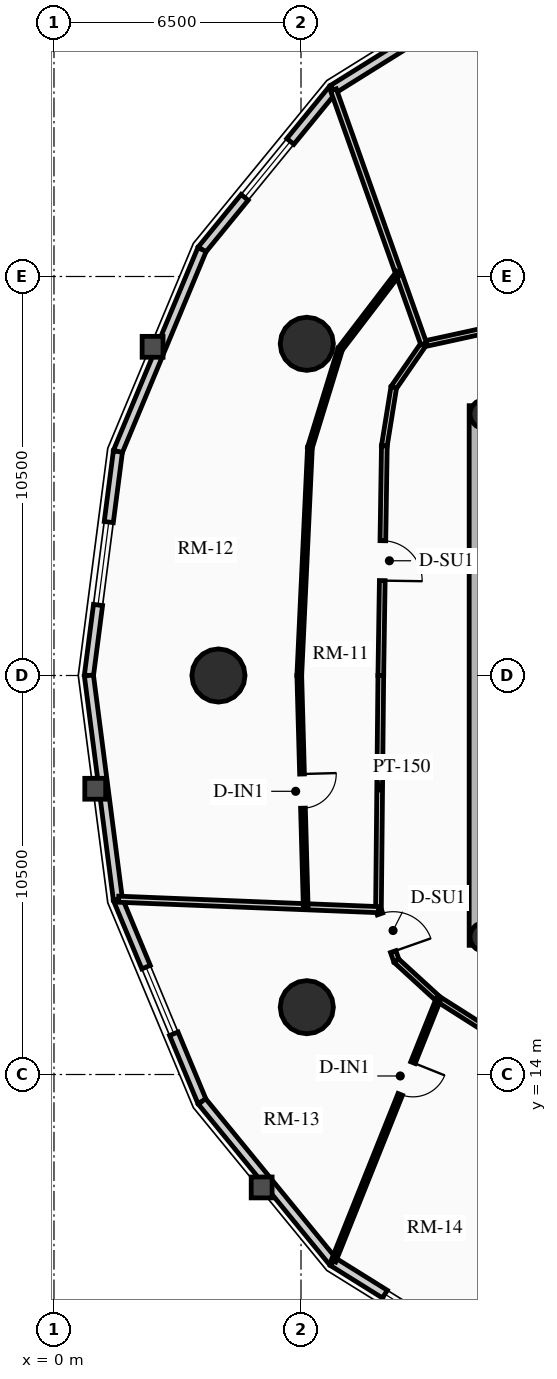
"""IFC4 building model, lengths in metres.
Left out: names, types, materials, properties, quantities, classifications, styles, units other than length and angle.
Written with IfcOpenShell. Run it as: python <this file> out.ifc"""

import sys

from ifc_helpers import new_model, si_unit, direction, frame, frame_2d, origin, origin_2d, place, context, subcontext, project, spatial, rectangle, circle, hollow_circle, extrude, source, transform, mapped, element, fill, save


model = new_model("IFC4")
c1 = context("Model", 3, precision=1e-05, world=origin(), true_north=direction((0.0, 1.0)))
c2 = subcontext(c1, "Body", "Model", "MODEL_VIEW")
j1 = project(units=[si_unit("LENGTHUNIT", "METRE"), si_unit("PLANEANGLEUNIT", "RADIAN")], contexts=[c1])
p1 = place(None, origin())
s1 = spatial("IfcSite", under=j1, at=p1, CompositionType="ELEMENT")
p2 = place(p1, origin())
s2 = spatial("IfcBuilding", under=s1, at=p2, CompositionType="ELEMENT")
p3 = place(p2, frame((0.0, 0.0, 113.8)))
s3 = spatial("IfcBuildingStorey", under=s2, at=p3, CompositionType="ELEMENT", Elevation=113.8)
p4 = place(p3, frame((11.15, 17.4, 0.0), z_axis=(0.0, 0.0, 1.0), x_axis=(0.0, 1.0, 0.0)))
e1 = element("IfcWall", 1, at=p4, inside=s3, PredefinedType="SHEAR", context=c2, shape_type="SweptSolid", body=[
    extrude(rectangle(XDim=14.2, YDim=0.45, at=frame_2d((7.1, 0.0))), origin(), (0.0, 0.0, 1.0), 2.91),
])
for number, where, z_axis, x_axis in (
    (2, (11.325, 17.62, 0.0), (0.0, 0.0, 1.0), (1.0, 0.0, 0.0)),
    (3, (11.325, 31.38, 0.0), (0.0, 0.0, 1.0), (1.0, 0.0, 0.0)),
):
    element("IfcColumn", number, at=place(p3, frame(where, z_axis=z_axis, x_axis=x_axis)), inside=s3, PredefinedType="COLUMN", context=c2, shape_type="SweptSolid", body=[
        extrude(hollow_circle(Radius=0.38, WallThickness=0.032, at=origin_2d()), origin(), (0.0, 0.0, 1.0), 2.91),
    ])
for number, where, z_axis, x_axis in (
    (4, (6.653, 33.229, 0.0), (0.0, 0.0, 1.0), (1.0, 0.0, 0.0)),
    (5, (4.328, 24.5, 0.0), (0.0, 0.0, 1.0), (1.0, 0.0, 0.0)),
    (6, (6.653, 15.771, 0.0), (0.0, 0.0, 1.0), (1.0, 0.0, 0.0)),
):
    element("IfcColumn", number, at=place(p3, frame(where, z_axis=z_axis, x_axis=x_axis)), inside=s3, PredefinedType="USERDEFINED", context=c2, shape_type="SweptSolid", body=[
        extrude(circle(Radius=0.7, at=origin_2d()), origin(), (0.0, 0.0, 1.0), 2.91),
    ])
p5 = place(p3, frame((7.342, 39.928, 0.0), z_axis=(0.0, 0.0, 1.0), x_axis=(0.848520380187, 0.529162701263, 0.0)))
e7 = element("IfcWall", 7, at=p5, inside=s3, PredefinedType="SOLIDWALL", context=c2, shape_type="SweptSolid", body=[
    extrude(rectangle(XDim=5.119, YDim=0.24, at=frame_2d((2.56, 0.0))), origin(), (0.0, 0.0, 1.0), 2.179),
])
p6 = place(p3, frame((3.895, 35.709, 0.0), z_axis=(0.0, 0.0, 1.0), x_axis=(0.632700781152, 0.77439635945, 0.0)))
e8 = element("IfcWall", 8, at=p6, inside=s3, PredefinedType="SOLIDWALL", context=c2, shape_type="SweptSolid", body=[
    extrude(rectangle(XDim=5.448, YDim=0.24, at=frame_2d((2.724, 0.0))), origin(), (0.0, 0.0, 1.0), 2.179),
])
m1 = source(origin(), c2, "Body", "SweptSolid", [
    extrude(rectangle(XDim=1.9, YDim=1.35, at=frame_2d((0.95, 0.675))), frame((0.0, 0.13, 0.0), z_axis=(0.0, -1.0, 0.0), x_axis=(1.0, 0.0, 0.0)), (0.0, 0.0, 1.0), 0.26),
])
p7 = place(p6, frame((1.774, 0.0, 0.65)))
e9 = element("IfcOpeningElement", 9, at=p7, cuts=e8, PredefinedType="OPENING", context=c2, shape_type="MappedRepresentation", body=[
    mapped(m1, transform((0.0, 0.0, 0.0), x_axis=(1.0, 0.0, 0.0), y_axis=(0.0, 1.0, 0.0), z_axis=(0.0, 0.0, 1.0), scale=1.0)),
])
p8 = place(p3, frame((1.682, 30.393, 0.0), z_axis=(0.0, 0.0, 1.0), x_axis=(0.384344417632, 0.923189779317, 0.0)))
e10 = element("IfcWall", 10, at=p8, inside=s3, PredefinedType="SOLIDWALL", context=c2, shape_type="SweptSolid", body=[
    extrude(rectangle(XDim=5.758, YDim=0.24, at=frame_2d((2.879, 0.0))), origin(), (0.0, 0.0, 1.0), 2.179),
])
p9 = place(p3, frame((0.919, 24.5, 0.0), z_axis=(0.0, 0.0, 1.0), x_axis=(0.128351991996, 0.991728675672, 0.0)))
e11 = element("IfcWall", 11, at=p9, inside=s3, PredefinedType="SOLIDWALL", context=c2, shape_type="SweptSolid", body=[
    extrude(rectangle(XDim=5.942, YDim=0.24, at=frame_2d((2.971, 0.0))), origin(), (0.0, 0.0, 1.0), 2.179),
])
m2 = source(origin(), c2, "Body", "SweptSolid", [
    extrude(rectangle(XDim=2.2, YDim=1.35, at=frame_2d((1.1, 0.675))), frame((0.0, 0.13, 0.0), z_axis=(0.0, -1.0, 0.0), x_axis=(1.0, 0.0, 0.0)), (0.0, 0.0, 1.0), 0.26),
])
p10 = place(p9, frame((1.871, 0.0, 0.65)))
e12 = element("IfcOpeningElement", 12, at=p10, cuts=e11, PredefinedType="OPENING", context=c2, shape_type="MappedRepresentation", body=[
    mapped(m2, transform((0.0, 0.0, 0.0), x_axis=(1.0, 0.0, 0.0), y_axis=(0.0, 1.0, 0.0), z_axis=(0.0, 0.0, 1.0), scale=1.0)),
])
p11 = place(p3, frame((1.682, 18.607, 0.0), z_axis=(0.0, 0.0, 1.0), x_axis=(-0.128351991996, 0.991728675672, 0.0)))
e13 = element("IfcWall", 13, at=p11, inside=s3, PredefinedType="SOLIDWALL", context=c2, shape_type="SweptSolid", body=[
    extrude(rectangle(XDim=5.942, YDim=0.24, at=frame_2d((2.971, 0.0))), origin(), (0.0, 0.0, 1.0), 2.179),
])
p12 = place(p3, frame((3.895, 13.291, 0.0), z_axis=(0.0, 0.0, 1.0), x_axis=(-0.384344417632, 0.923189779317, 0.0)))
e14 = element("IfcWall", 14, at=p12, inside=s3, PredefinedType="SOLIDWALL", context=c2, shape_type="SweptSolid", body=[
    extrude(rectangle(XDim=5.758, YDim=0.24, at=frame_2d((2.879, 0.0))), origin(), (0.0, 0.0, 1.0), 2.179),
])
p13 = place(p12, frame((1.929, 0.0, 0.65)))
e15 = element("IfcOpeningElement", 15, at=p13, cuts=e14, PredefinedType="OPENING", context=c2, shape_type="MappedRepresentation", body=[
    mapped(m1, transform((0.0, 0.0, 0.0), x_axis=(1.0, 0.0, 0.0), y_axis=(0.0, 1.0, 0.0), z_axis=(0.0, 0.0, 1.0), scale=1.0)),
])
p14 = place(p3, frame((7.342, 9.072, 0.0), z_axis=(0.0, 0.0, 1.0), x_axis=(-0.632700781152, 0.77439635945, 0.0)))
e16 = element("IfcWall", 16, at=p14, inside=s3, PredefinedType="SOLIDWALL", context=c2, shape_type="SweptSolid", body=[
    extrude(rectangle(XDim=5.448, YDim=0.24, at=frame_2d((2.724, 0.0))), origin(), (0.0, 0.0, 1.0), 2.179),
])
p15 = place(p3, frame((11.685, 6.363, 0.0), z_axis=(0.0, 0.0, 1.0), x_axis=(-0.848520380187, 0.529162701263, 0.0)))
e17 = element("IfcWall", 17, at=p15, inside=s3, PredefinedType="SOLIDWALL", context=c2, shape_type="SweptSolid", body=[
    extrude(rectangle(XDim=5.119, YDim=0.24, at=frame_2d((2.56, 0.0))), origin(), (0.0, 0.0, 1.0), 2.179),
])
p16 = place(p15, frame((1.609, 0.0, 0.65)))
e18 = element("IfcOpeningElement", 18, at=p16, cuts=e17, PredefinedType="OPENING", context=c2, shape_type="MappedRepresentation", body=[
    mapped(m1, transform((0.0, 0.0, 0.0), x_axis=(1.0, 0.0, 0.0), y_axis=(0.0, 1.0, 0.0), z_axis=(0.0, 0.0, 1.0), scale=1.0)),
])
p17 = place(p3, frame((11.62, 33.637, 0.0), z_axis=(0.0, 0.0, 1.0), x_axis=(-0.97702579435, -0.213121085711, 0.0)))
e19 = element("IfcWall", 19, at=p17, inside=s3, PredefinedType="PARTITIONING", context=c2, shape_type="SweptSolid", body=[
    extrude(rectangle(XDim=1.935, YDim=0.15, at=frame_2d((0.967, 0.0))), origin(), (0.0, 0.0, 1.0), 2.225),
])
p18 = place(p3, frame((9.729, 33.225, 0.0), z_axis=(0.0, 0.0, 1.0), x_axis=(-0.567183649484, -0.82359134755, 0.0)))
e20 = element("IfcWall", 20, at=p18, inside=s3, PredefinedType="PARTITIONING", context=c2, shape_type="SweptSolid", body=[
    extrude(rectangle(XDim=1.392, YDim=0.15, at=frame_2d((0.696, 0.0))), origin(), (0.0, 0.0, 1.0), 2.225),
])
p19 = place(p3, frame((8.94, 32.078, 0.0), z_axis=(0.0, 0.0, 1.0), x_axis=(-0.159148467753, -0.98725466077, 0.0)))
e21 = element("IfcWall", 21, at=p19, inside=s3, PredefinedType="PARTITIONING", context=c2, shape_type="SweptSolid", body=[
    extrude(rectangle(XDim=1.554, YDim=0.15, at=frame_2d((0.777, 0.0))), origin(), (0.0, 0.0, 1.0), 2.225),
])
p20 = place(p3, frame((8.693, 30.544, 0.0), z_axis=(0.0, 0.0, 1.0), x_axis=(-0.015307007986, -0.99988284089, 0.0)))
e22 = element("IfcWall", 22, at=p20, inside=s3, PredefinedType="PARTITIONING", context=c2, shape_type="SweptSolid", body=[
    extrude(rectangle(XDim=6.045, YDim=0.15, at=frame_2d((3.022, 0.0))), origin(), (0.0, 0.0, 1.0), 2.655),
])
m3 = source(origin(), c2, "Body", "SweptSolid", [
    extrude(rectangle(XDim=1.05, YDim=2.015, at=frame_2d((0.525, 1.007))), frame((0.0, 0.085, 0.0), z_axis=(0.0, -1.0, 0.0), x_axis=(1.0, 0.0, 0.0)), (0.0, 0.0, 1.0), 0.17),
])
p21 = place(p20, frame((2.497, 0.0, 0.0)))
e23 = element("IfcOpeningElement", 23, at=p21, cuts=e22, PredefinedType="OPENING", context=c2, shape_type="MappedRepresentation", body=[
    mapped(m3, transform((0.0, 0.0, 0.0), x_axis=(1.0, 0.0, 0.0), y_axis=(0.0, 1.0, 0.0), z_axis=(0.0, 0.0, 1.0), scale=1.0)),
])
p22 = place(p3, frame((8.6, 24.5, 0.0), z_axis=(0.0, 0.0, 1.0), x_axis=(-0.010023665349, -0.999949761805, 0.0)))
e24 = element("IfcWall", 24, at=p22, inside=s3, PredefinedType="PARTITIONING", context=c2, shape_type="SweptSolid", body=[
    extrude(rectangle(XDim=6.162, YDim=0.15, at=frame_2d((3.081, 0.0))), origin(), (0.0, 0.0, 1.0), 2.225),
])
p23 = place(p3, frame((8.538, 18.338, 0.0), z_axis=(0.0, 0.0, 1.0), x_axis=(0.331358150167, -0.94350504838, 0.0)))
e25 = element("IfcWall", 25, at=p23, inside=s3, PredefinedType="PARTITIONING", context=c2, shape_type="SweptSolid", body=[
    extrude(rectangle(XDim=1.424, YDim=0.15, at=frame_2d((0.712, 0.0))), origin(), (0.0, 0.0, 1.0), 2.225),
])
p24 = place(p23, frame((0.12, 0.0, 0.0)))
e26 = element("IfcOpeningElement", 26, at=p24, cuts=e25, PredefinedType="OPENING", context=c2, shape_type="MappedRepresentation", body=[
    mapped(m3, transform((0.0, 0.0, 0.0), x_axis=(1.0, 0.0, 0.0), y_axis=(0.0, 1.0, 0.0), z_axis=(0.0, 0.0, 1.0), scale=1.0)),
])
p25 = place(p3, frame((9.01, 16.994, 0.0), z_axis=(0.0, 0.0, 1.0), x_axis=(0.737701798986, -0.67512669609, 0.0)))
e27 = element("IfcWall", 27, at=p25, inside=s3, PredefinedType="PARTITIONING", context=c2, shape_type="SweptSolid", body=[
    extrude(rectangle(XDim=1.498, YDim=0.15, at=frame_2d((0.749, 0.0))), origin(), (0.0, 0.0, 1.0), 2.225),
])
p26 = place(p3, frame((10.115, 15.983, 0.0), z_axis=(0.0, 0.0, 1.0), x_axis=(0.843995849351, -0.536349705209, 0.0)))
e28 = element("IfcWall", 28, at=p26, inside=s3, PredefinedType="PARTITIONING", context=c2, shape_type="SweptSolid", body=[
    extrude(rectangle(XDim=1.593, YDim=0.15, at=frame_2d((0.796, 0.0))), origin(), (0.0, 0.0, 1.0), 2.225),
])
p27 = place(p3, frame((9.729, 33.225, 0.0), z_axis=(0.0, 0.0, 1.0), x_axis=(-0.334806049563, 0.942287063042, 0.0)))
e29 = element("IfcWall", 29, at=p27, inside=s3, PredefinedType="PARTITIONING", context=c2, shape_type="SweptSolid", body=[
    extrude(rectangle(XDim=7.097, YDim=0.16, at=frame_2d((3.548, 0.0))), origin(), (0.0, 0.0, 1.0), 2.179),
])
p28 = place(p3, frame((8.538, 18.338, 0.0), z_axis=(0.0, 0.0, 1.0), x_axis=(-0.999191355531, 0.04020740021, 0.0)))
e30 = element("IfcWall", 30, at=p28, inside=s3, PredefinedType="PARTITIONING", context=c2, shape_type="SweptSolid", body=[
    extrude(rectangle(XDim=6.843, YDim=0.16, at=frame_2d((3.422, 0.0))), origin(), (0.0, 0.0, 1.0), 2.179),
])
p29 = place(p3, frame((9.064, 35.097, 0.0), z_axis=(0.0, 0.0, 1.0), x_axis=(-0.607126893664, -0.794604892377, 0.0)))
e31 = element("IfcWall", 31, at=p29, inside=s3, PredefinedType="PARTITIONING", context=c2, shape_type="SweptSolid", body=[
    extrude(rectangle(XDim=2.524, YDim=0.125, at=frame_2d((1.262, 0.0))), origin(), (0.0, 0.0, 1.0), 2.179),
])
p30 = place(p3, frame((7.532, 33.092, 0.0), z_axis=(0.0, 0.0, 1.0), x_axis=(-0.293965637063, -0.955815988685, 0.0)))
e32 = element("IfcWall", 32, at=p30, inside=s3, PredefinedType="PARTITIONING", context=c2, shape_type="SweptSolid", body=[
    extrude(rectangle(XDim=2.712, YDim=0.125, at=frame_2d((1.356, 0.0))), origin(), (0.0, 0.0, 1.0), 2.225),
])
p31 = place(p3, frame((6.735, 30.5, 0.0), z_axis=(0.0, 0.0, 1.0), x_axis=(-0.046620801603, -0.998912659274, 0.0)))
e33 = element("IfcWall", 33, at=p31, inside=s3, PredefinedType="PARTITIONING", context=c2, shape_type="SweptSolid", body=[
    extrude(rectangle(XDim=6.007, YDim=0.125, at=frame_2d((3.003, 0.0))), origin(), (0.0, 0.0, 1.0), 2.655),
])
p32 = place(p3, frame((6.455, 24.5, 0.0), z_axis=(0.0, 0.0, 1.0), x_axis=(0.027753708707, -0.999614791634, 0.0)))
e34 = element("IfcWall", 34, at=p32, inside=s3, PredefinedType="PARTITIONING", context=c2, shape_type="SweptSolid", body=[
    extrude(rectangle(XDim=6.087, YDim=0.125, at=frame_2d((3.044, 0.0))), origin(), (0.0, 0.0, 1.0), 2.225),
])
m4 = source(origin(), c2, "Body", "SweptSolid", [
    extrude(rectangle(XDim=0.9, YDim=2.005, at=frame_2d((0.45, 1.002))), frame((0.0, 0.073, 0.0), z_axis=(0.0, -1.0, 0.0), x_axis=(1.0, 0.0, 0.0)), (0.0, 0.0, 1.0), 0.145),
])
p33 = place(p32, frame((2.594, 0.0, 0.0)))
e35 = element("IfcOpeningElement", 35, at=p33, cuts=e34, PredefinedType="OPENING", context=c2, shape_type="MappedRepresentation", body=[
    mapped(m4, transform((0.0, 0.0, 0.0), x_axis=(1.0, 0.0, 0.0), y_axis=(0.0, 1.0, 0.0), z_axis=(0.0, 0.0, 1.0), scale=1.0)),
])
p34 = place(p3, frame((10.115, 15.983, 0.0), z_axis=(0.0, 0.0, 1.0), x_axis=(-0.371861013147, -0.928288417951, 0.0)))
e36 = element("IfcWall", 36, at=p34, inside=s3, PredefinedType="PARTITIONING", context=c2, shape_type="SweptSolid", body=[
    extrude(rectangle(XDim=7.427, YDim=0.125, at=frame_2d((3.714, 0.0))), origin(), (0.0, 0.0, 1.0), 2.179),
])
p35 = place(p34, frame((1.8, 0.0, 0.0)))
e37 = element("IfcOpeningElement", 37, at=p35, cuts=e36, PredefinedType="OPENING", context=c2, shape_type="MappedRepresentation", body=[
    mapped(m4, transform((0.0, 0.0, 0.0), x_axis=(1.0, 0.0, 0.0), y_axis=(0.0, 1.0, 0.0), z_axis=(0.0, 0.0, 1.0), scale=1.0)),
])
m5 = source(origin(), c2, "Body", "SweptSolid", [
    extrude(rectangle(XDim=1.9, YDim=1.35, at=frame_2d((0.95, 0.675))), frame((0.0, 0.03, 0.0), z_axis=(0.0, -1.0, 0.0), x_axis=(1.0, 0.0, 0.0)), (0.0, 0.0, 1.0), 0.06),
])
p36 = place(p7, origin())
e38 = element("IfcWindow", 38, at=p36, inside=s3, PartitioningType="DOUBLE_PANEL_VERTICAL", PredefinedType="WINDOW", context=c2, shape_type="MappedRepresentation", body=[
    mapped(m5, transform((0.0, 0.0, 0.0), x_axis=(1.0, 0.0, 0.0), y_axis=(0.0, 1.0, 0.0), z_axis=(0.0, 0.0, 1.0), scale=1.0)),
])
fill(e9, e38)
m6 = source(origin(), c2, "Body", "SweptSolid", [
    extrude(rectangle(XDim=2.2, YDim=1.35, at=frame_2d((1.1, 0.675))), frame((0.0, 0.03, 0.0), z_axis=(0.0, -1.0, 0.0), x_axis=(1.0, 0.0, 0.0)), (0.0, 0.0, 1.0), 0.06),
])
p37 = place(p10, origin())
e39 = element("IfcWindow", 39, at=p37, inside=s3, PartitioningType="DOUBLE_PANEL_VERTICAL", PredefinedType="WINDOW", context=c2, shape_type="MappedRepresentation", body=[
    mapped(m6, transform((0.0, 0.0, 0.0), x_axis=(1.0, 0.0, 0.0), y_axis=(0.0, 1.0, 0.0), z_axis=(0.0, 0.0, 1.0), scale=1.0)),
])
fill(e12, e39)
p38 = place(p13, origin())
e40 = element("IfcWindow", 40, at=p38, inside=s3, PartitioningType="DOUBLE_PANEL_VERTICAL", PredefinedType="WINDOW", context=c2, shape_type="MappedRepresentation", body=[
    mapped(m5, transform((0.0, 0.0, 0.0), x_axis=(1.0, 0.0, 0.0), y_axis=(0.0, 1.0, 0.0), z_axis=(0.0, 0.0, 1.0), scale=1.0)),
])
fill(e15, e40)
p39 = place(p16, origin())
e41 = element("IfcWindow", 41, at=p39, inside=s3, PartitioningType="DOUBLE_PANEL_VERTICAL", PredefinedType="WINDOW", context=c2, shape_type="MappedRepresentation", body=[
    mapped(m5, transform((0.0, 0.0, 0.0), x_axis=(1.0, 0.0, 0.0), y_axis=(0.0, 1.0, 0.0), z_axis=(0.0, 0.0, 1.0), scale=1.0)),
])
fill(e18, e41)
m7 = source(origin(), c2, "Body", "SweptSolid", [
    extrude(rectangle(XDim=1.05, YDim=2.015, at=frame_2d((0.525, 1.007))), frame((0.0, 0.025, 0.0), z_axis=(0.0, -1.0, 0.0), x_axis=(1.0, 0.0, 0.0)), (0.0, 0.0, 1.0), 0.05),
])
p40 = place(p21, origin())
e42 = element("IfcDoor", 42, at=p40, inside=s3, OperationType="SINGLE_SWING_RIGHT", PredefinedType="DOOR", context=c2, shape_type="MappedRepresentation", body=[
    mapped(m7, transform((0.0, 0.0, 0.0), x_axis=(1.0, 0.0, 0.0), y_axis=(0.0, 1.0, 0.0), z_axis=(0.0, 0.0, 1.0), scale=1.0)),
])
fill(e23, e42)
m8 = source(origin(), c2, "Body", "SweptSolid", [
    extrude(rectangle(XDim=0.9, YDim=2.005, at=frame_2d((0.45, 1.002))), frame((0.0, 0.025, 0.0), z_axis=(0.0, -1.0, 0.0), x_axis=(1.0, 0.0, 0.0)), (0.0, 0.0, 1.0), 0.05),
])
p41 = place(p33, origin())
e43 = element("IfcDoor", 43, at=p41, inside=s3, OperationType="SINGLE_SWING_LEFT", PredefinedType="DOOR", context=c2, shape_type="MappedRepresentation", body=[
    mapped(m8, transform((0.0, 0.0, 0.0), x_axis=(1.0, 0.0, 0.0), y_axis=(0.0, 1.0, 0.0), z_axis=(0.0, 0.0, 1.0), scale=1.0)),
])
fill(e35, e43)
p42 = place(p24, origin())
e44 = element("IfcDoor", 44, at=p42, inside=s3, OperationType="SINGLE_SWING_RIGHT", PredefinedType="DOOR", context=c2, shape_type="MappedRepresentation", body=[
    mapped(m7, transform((0.0, 0.0, 0.0), x_axis=(1.0, 0.0, 0.0), y_axis=(0.0, 1.0, 0.0), z_axis=(0.0, 0.0, 1.0), scale=1.0)),
])
fill(e26, e44)
p43 = place(p35, origin())
e45 = element("IfcDoor", 45, at=p43, inside=s3, OperationType="SINGLE_SWING_LEFT", PredefinedType="DOOR", context=c2, shape_type="MappedRepresentation", body=[
    mapped(m8, transform((0.0, 0.0, 0.0), x_axis=(1.0, 0.0, 0.0), y_axis=(0.0, 1.0, 0.0), z_axis=(0.0, 0.0, 1.0), scale=1.0)),
])
fill(e37, e45)
save(model, sys.argv[1])
